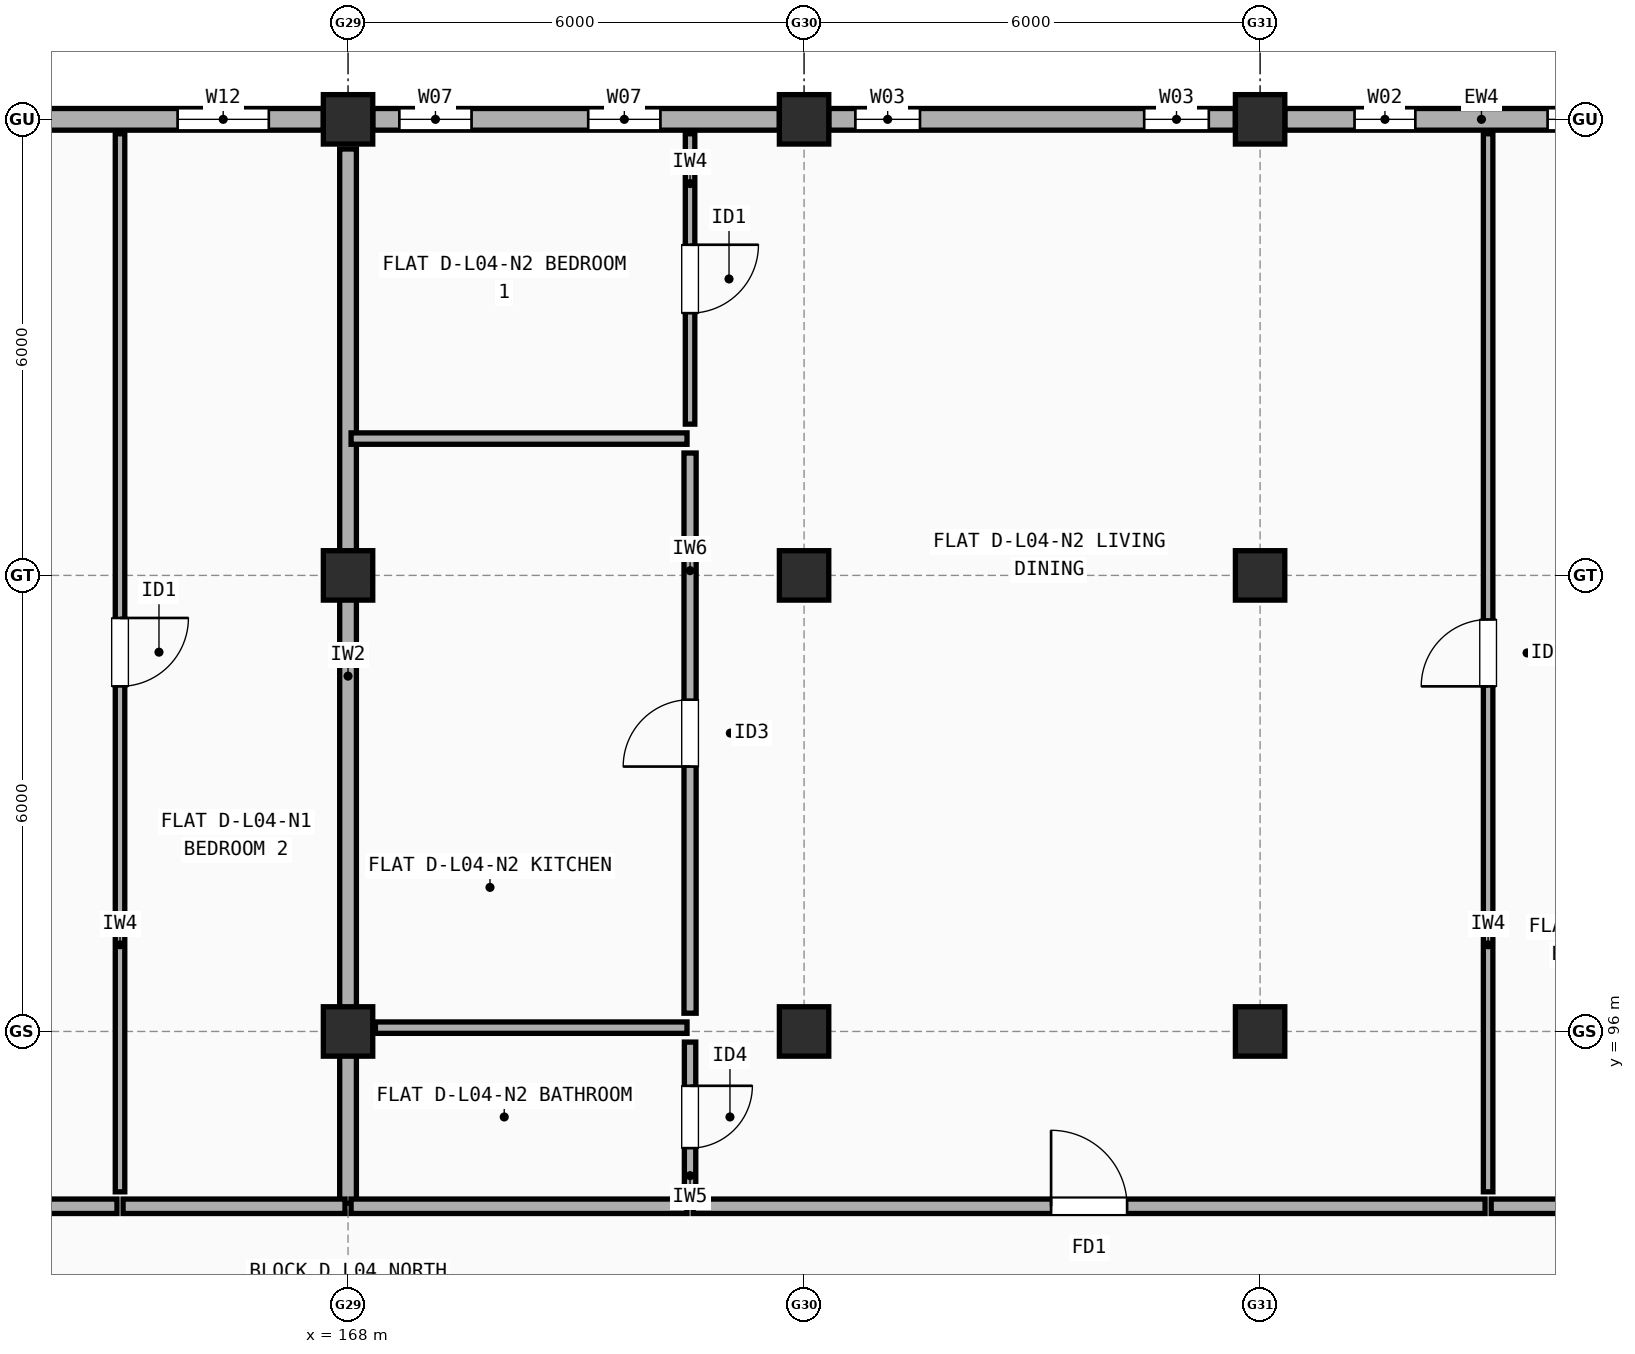
"""IFC4 building model, lengths in metres.
Left out: names, types, materials, properties, quantities, classifications, styles, units other than length and angle.
Written with IfcOpenShell. Run it as: python <this file> out.ifc"""

import sys

from ifc_helpers import new_model, si_unit, direction, frame, frame_2d, origin, origin_2d, place, context, subcontext, project, spatial, rectangle, extrude, element, fill, save


model = new_model("IFC4")
c1 = context("Model", 3, precision=1e-05, world=origin(), true_north=direction((0.0, 1.0)))
c2 = subcontext(c1, "Body", "Model", "MODEL_VIEW")
j1 = project(units=[si_unit("LENGTHUNIT", "METRE"), si_unit("PLANEANGLEUNIT", "RADIAN")], contexts=[c1])
p1 = place(None, origin())
s1 = spatial("IfcSite", under=j1, at=p1, CompositionType="ELEMENT")
p2 = place(p1, origin())
s2 = spatial("IfcBuilding", under=s1, at=p2, CompositionType="ELEMENT")
p3 = place(p2, frame((0.0, 0.0, 14.1)))
s3 = spatial("IfcBuildingStorey", under=s2, at=p3, CompositionType="ELEMENT", Elevation=14.1)
for number, where, z_axis, x_axis in (
    (1, (168.0, 96.0, 0.0), (0.0, 0.0, 1.0), (1.0, 0.0, 0.0)),
    (2, (168.0, 102.0, 0.0), (0.0, 0.0, 1.0), (1.0, 0.0, 0.0)),
    (3, (168.0, 108.0, 0.0), (0.0, 0.0, 1.0), (1.0, 0.0, 0.0)),
    (4, (174.0, 96.0, 0.0), (0.0, 0.0, 1.0), (1.0, 0.0, 0.0)),
    (5, (174.0, 102.0, 0.0), (0.0, 0.0, 1.0), (1.0, 0.0, 0.0)),
    (6, (174.0, 108.0, 0.0), (0.0, 0.0, 1.0), (1.0, 0.0, 0.0)),
    (7, (180.0, 96.0, 0.0), (0.0, 0.0, 1.0), (1.0, 0.0, 0.0)),
    (8, (180.0, 102.0, 0.0), (0.0, 0.0, 1.0), (1.0, 0.0, 0.0)),
    (9, (180.0, 108.0, 0.0), (0.0, 0.0, 1.0), (1.0, 0.0, 0.0)),
):
    element("IfcColumn", number, at=place(p3, frame(where, z_axis=z_axis, x_axis=x_axis)), inside=s3, PredefinedType="COLUMN", context=c2, shape_type="SweptSolid", body=[
        extrude(rectangle(XDim=0.65, YDim=0.65, at=origin_2d()), origin(), (0.0, 0.0, 1.0), 2.95),
    ])
p4 = place(p3, frame((185.725, 108.0, 0.0), z_axis=(0.0, 0.0, 1.0), x_axis=(-1.0, 0.0, 0.0)))
e10 = element("IfcWall", 10, at=p4, inside=s3, PredefinedType="STANDARD", context=c2, shape_type="SweptSolid", body=[
    extrude(rectangle(XDim=5.4, YDim=0.285, at=frame_2d((2.7, 0.0))), origin(), (0.0, 0.0, 1.0), 2.432),
])
p5 = place(p4, frame((0.742, 0.0, 0.9)))
e11 = element("IfcOpeningElement", 11, at=p5, cuts=e10, PredefinedType="OPENING", context=c2, shape_type="SweptSolid", body=[
    extrude(rectangle(XDim=1.2, YDim=1.35, at=frame_2d((0.6, 0.675))), frame((0.0, 0.152, 0.0), z_axis=(0.0, -1.0, 0.0), x_axis=(1.0, 0.0, 0.0)), (0.0, 0.0, 1.0), 0.305),
])
p6 = place(p4, frame((3.683, 0.0, 0.9)))
e12 = element("IfcOpeningElement", 12, at=p6, cuts=e10, PredefinedType="OPENING", context=c2, shape_type="SweptSolid", body=[
    extrude(rectangle(XDim=0.8, YDim=1.2, at=frame_2d((0.4, 0.6))), frame((0.0, 0.152, 0.0), z_axis=(0.0, -1.0, 0.0), x_axis=(1.0, 0.0, 0.0)), (0.0, 0.0, 1.0), 0.305),
])
p7 = place(p3, frame((179.675, 108.0, 0.0), z_axis=(0.0, 0.0, 1.0), x_axis=(-1.0, 0.0, 0.0)))
e13 = element("IfcWall", 13, at=p7, inside=s3, PredefinedType="STANDARD", context=c2, shape_type="SweptSolid", body=[
    extrude(rectangle(XDim=5.35, YDim=0.285, at=frame_2d((2.675, 0.0))), origin(), (0.0, 0.0, 1.0), 2.432),
])
p8 = place(p7, frame((0.35, 0.0, 0.9)))
e14 = element("IfcOpeningElement", 14, at=p8, cuts=e13, PredefinedType="OPENING", context=c2, shape_type="SweptSolid", body=[
    extrude(rectangle(XDim=0.85, YDim=1.25, at=frame_2d((0.425, 0.625))), frame((0.0, 0.152, 0.0), z_axis=(0.0, -1.0, 0.0), x_axis=(1.0, 0.0, 0.0)), (0.0, 0.0, 1.0), 0.305),
])
p9 = place(p7, frame((4.15, 0.0, 0.9)))
e15 = element("IfcOpeningElement", 15, at=p9, cuts=e13, PredefinedType="OPENING", context=c2, shape_type="SweptSolid", body=[
    extrude(rectangle(XDim=0.85, YDim=1.25, at=frame_2d((0.425, 0.625))), frame((0.0, 0.152, 0.0), z_axis=(0.0, -1.0, 0.0), x_axis=(1.0, 0.0, 0.0)), (0.0, 0.0, 1.0), 0.305),
])
p10 = place(p3, frame((173.675, 108.0, 0.0), z_axis=(0.0, 0.0, 1.0), x_axis=(-1.0, 0.0, 0.0)))
e16 = element("IfcWall", 16, at=p10, inside=s3, PredefinedType="STANDARD", context=c2, shape_type="SweptSolid", body=[
    extrude(rectangle(XDim=5.35, YDim=0.285, at=frame_2d((2.675, 0.0))), origin(), (0.0, 0.0, 1.0), 2.432),
])
p11 = place(p10, frame((1.565, 0.0, 0.9)))
e17 = element("IfcOpeningElement", 17, at=p11, cuts=e16, PredefinedType="OPENING", context=c2, shape_type="SweptSolid", body=[
    extrude(rectangle(XDim=0.95, YDim=1.35, at=frame_2d((0.475, 0.675))), frame((0.0, 0.152, 0.0), z_axis=(0.0, -1.0, 0.0), x_axis=(1.0, 0.0, 0.0)), (0.0, 0.0, 1.0), 0.305),
])
p12 = place(p10, frame((4.05, 0.0, 0.9)))
e18 = element("IfcOpeningElement", 18, at=p12, cuts=e16, PredefinedType="OPENING", context=c2, shape_type="SweptSolid", body=[
    extrude(rectangle(XDim=0.95, YDim=1.35, at=frame_2d((0.475, 0.675))), frame((0.0, 0.152, 0.0), z_axis=(0.0, -1.0, 0.0), x_axis=(1.0, 0.0, 0.0)), (0.0, 0.0, 1.0), 0.305),
])
p13 = place(p3, frame((167.675, 108.0, 0.0), z_axis=(0.0, 0.0, 1.0), x_axis=(-1.0, 0.0, 0.0)))
e19 = element("IfcWall", 19, at=p13, inside=s3, PredefinedType="STANDARD", context=c2, shape_type="SweptSolid", body=[
    extrude(rectangle(XDim=5.35, YDim=0.285, at=frame_2d((2.675, 0.0))), origin(), (0.0, 0.0, 1.0), 2.432),
])
p14 = place(p13, frame((0.718, 0.0, 0.9)))
e20 = element("IfcOpeningElement", 20, at=p14, cuts=e19, PredefinedType="OPENING", context=c2, shape_type="SweptSolid", body=[
    extrude(rectangle(XDim=1.2, YDim=1.35, at=frame_2d((0.6, 0.675))), frame((0.0, 0.152, 0.0), z_axis=(0.0, -1.0, 0.0), x_axis=(1.0, 0.0, 0.0)), (0.0, 0.0, 1.0), 0.305),
])
p15 = place(p13, frame((3.633, 0.0, 0.9)))
e21 = element("IfcOpeningElement", 21, at=p15, cuts=e19, PredefinedType="OPENING", context=c2, shape_type="SweptSolid", body=[
    extrude(rectangle(XDim=0.8, YDim=1.2, at=frame_2d((0.4, 0.6))), frame((0.0, 0.152, 0.0), z_axis=(0.0, -1.0, 0.0), x_axis=(1.0, 0.0, 0.0)), (0.0, 0.0, 1.0), 0.305),
])
p16 = place(p3, frame((168.0, 93.74, 0.0), z_axis=(0.0, 0.0, 1.0), x_axis=(0.0, 1.0, 0.0)))
e22 = element("IfcWall", 22, at=p16, inside=s3, PredefinedType="SOLIDWALL", context=c2, shape_type="SweptSolid", body=[
    extrude(rectangle(XDim=13.87, YDim=0.22, at=frame_2d((6.935, 0.0))), origin(), (0.0, 0.0, 1.0), 2.458),
])
p17 = place(p3, frame((154.54, 93.7, 0.0), z_axis=(0.0, 0.0, 1.0), x_axis=(1.0, 0.0, 0.0)))
e23 = element("IfcWall", 23, at=p17, inside=s3, PredefinedType="SOLIDWALL", context=c2, shape_type="SweptSolid", body=[
    extrude(rectangle(XDim=10.42, YDim=0.19, at=frame_2d((5.21, 0.0))), origin(), (0.0, 0.0, 1.0), 2.432),
])
p18 = place(p17, frame((4.72, 0.0, 0.0)))
e24 = element("IfcOpeningElement", 24, at=p18, cuts=e23, PredefinedType="OPENING", context=c2, shape_type="SweptSolid", body=[
    extrude(rectangle(XDim=0.98, YDim=2.15, at=frame_2d((0.49, 1.075))), frame((0.0, 0.105, 0.0), z_axis=(0.0, -1.0, 0.0), x_axis=(1.0, 0.0, 0.0)), (0.0, 0.0, 1.0), 0.21),
])
p19 = place(p3, frame((165.04, 93.7, 0.0), z_axis=(0.0, 0.0, 1.0), x_axis=(1.0, 0.0, 0.0)))
e25 = element("IfcWall", 25, at=p19, inside=s3, PredefinedType="SOLIDWALL", context=c2, shape_type="SweptSolid", body=[
    extrude(rectangle(XDim=2.92, YDim=0.19, at=frame_2d((1.46, 0.0))), origin(), (0.0, 0.0, 1.0), 2.508),
])
p20 = place(p3, frame((165.0, 93.89, 0.0), z_axis=(0.0, 0.0, 1.0), x_axis=(0.0, 1.0, 0.0)))
e26 = element("IfcWall", 26, at=p20, inside=s3, PredefinedType="PARTITIONING", context=c2, shape_type="SweptSolid", body=[
    extrude(rectangle(XDim=13.92, YDim=0.125, at=frame_2d((6.96, 0.0))), origin(), (0.0, 0.0, 1.0), 2.408),
])
p21 = place(p20, frame((6.65, 0.0, 0.0)))
e27 = element("IfcOpeningElement", 27, at=p21, cuts=e26, PredefinedType="OPENING", context=c2, shape_type="SweptSolid", body=[
    extrude(rectangle(XDim=0.9, YDim=2.1, at=frame_2d((0.45, 1.05))), frame((0.0, 0.073, 0.0), z_axis=(0.0, -1.0, 0.0), x_axis=(1.0, 0.0, 0.0)), (0.0, 0.0, 1.0), 0.145),
])
p22 = place(p3, frame((168.04, 93.7, 0.0), z_axis=(0.0, 0.0, 1.0), x_axis=(1.0, 0.0, 0.0)))
e28 = element("IfcWall", 28, at=p22, inside=s3, PredefinedType="SOLIDWALL", context=c2, shape_type="SweptSolid", body=[
    extrude(rectangle(XDim=4.42, YDim=0.19, at=frame_2d((2.21, 0.0))), origin(), (0.0, 0.0, 1.0), 2.508),
])
p23 = place(p3, frame((172.54, 93.7, 0.0), z_axis=(0.0, 0.0, 1.0), x_axis=(1.0, 0.0, 0.0)))
e29 = element("IfcWall", 29, at=p23, inside=s3, PredefinedType="SOLIDWALL", context=c2, shape_type="SweptSolid", body=[
    extrude(rectangle(XDim=10.42, YDim=0.19, at=frame_2d((5.21, 0.0))), origin(), (0.0, 0.0, 1.0), 2.95),
])
p24 = place(p23, frame((4.71, 0.0, 0.0)))
e30 = element("IfcOpeningElement", 30, at=p24, cuts=e29, PredefinedType="OPENING", context=c2, shape_type="SweptSolid", body=[
    extrude(rectangle(XDim=1.0, YDim=2.15, at=frame_2d((0.5, 1.075))), frame((0.0, 0.105, 0.0), z_axis=(0.0, -1.0, 0.0), x_axis=(1.0, 0.0, 0.0)), (0.0, 0.0, 1.0), 0.21),
])
p25 = place(p3, frame((172.5, 103.99, 0.0), z_axis=(0.0, 0.0, 1.0), x_axis=(0.0, 1.0, 0.0)))
e31 = element("IfcWall", 31, at=p25, inside=s3, PredefinedType="PARTITIONING", context=c2, shape_type="SweptSolid", body=[
    extrude(rectangle(XDim=3.82, YDim=0.125, at=frame_2d((1.91, 0.0))), origin(), (0.0, 0.0, 1.0), 2.95),
])
p26 = place(p25, frame((1.46, 0.0, 0.0)))
e32 = element("IfcOpeningElement", 32, at=p26, cuts=e31, PredefinedType="OPENING", context=c2, shape_type="SweptSolid", body=[
    extrude(rectangle(XDim=0.9, YDim=2.1, at=frame_2d((0.45, 1.05))), frame((0.0, 0.073, 0.0), z_axis=(0.0, -1.0, 0.0), x_axis=(1.0, 0.0, 0.0)), (0.0, 0.0, 1.0), 0.145),
])
p27 = place(p3, frame((172.5, 96.24, 0.0), z_axis=(0.0, 0.0, 1.0), x_axis=(0.0, 1.0, 0.0)))
e33 = element("IfcWall", 33, at=p27, inside=s3, PredefinedType="PLUMBINGWALL", context=c2, shape_type="SweptSolid", body=[
    extrude(rectangle(XDim=7.37, YDim=0.16, at=frame_2d((3.685, 0.0))), origin(), (0.0, 0.0, 1.0), 2.432),
])
p28 = place(p27, frame((3.245, 0.0, 0.0)))
e34 = element("IfcOpeningElement", 34, at=p28, cuts=e33, PredefinedType="OPENING", context=c2, shape_type="SweptSolid", body=[
    extrude(rectangle(XDim=0.88, YDim=2.1, at=frame_2d((0.44, 1.05))), frame((0.0, 0.09, 0.0), z_axis=(0.0, -1.0, 0.0), x_axis=(1.0, 0.0, 0.0)), (0.0, 0.0, 1.0), 0.18),
])
p29 = place(p3, frame((172.5, 93.89, 0.0), z_axis=(0.0, 0.0, 1.0), x_axis=(0.0, 1.0, 0.0)))
e35 = element("IfcWall", 35, at=p29, inside=s3, PredefinedType="PARTITIONING", context=c2, shape_type="SweptSolid", body=[
    extrude(rectangle(XDim=1.97, YDim=0.15, at=frame_2d((0.985, 0.0))), origin(), (0.0, 0.0, 1.0), 2.95),
])
p30 = place(p29, frame((0.575, 0.0, 0.0)))
e36 = element("IfcOpeningElement", 36, at=p30, cuts=e35, PredefinedType="OPENING", context=c2, shape_type="SweptSolid", body=[
    extrude(rectangle(XDim=0.82, YDim=2.08, at=frame_2d((0.41, 1.04))), frame((0.0, 0.085, 0.0), z_axis=(0.0, -1.0, 0.0), x_axis=(1.0, 0.0, 0.0)), (0.0, 0.0, 1.0), 0.17),
])
p31 = place(p3, frame((168.04, 103.8, 0.0), z_axis=(0.0, 0.0, 1.0), x_axis=(1.0, 0.0, 0.0)))
e37 = element("IfcWall", 37, at=p31, inside=s3, PredefinedType="PARTITIONING", context=c2, shape_type="SweptSolid", body=[
    extrude(rectangle(XDim=4.42, YDim=0.15, at=frame_2d((2.21, 0.0))), origin(), (0.0, 0.0, 1.0), 2.458),
])
p32 = place(p3, frame((168.36, 96.05, 0.0), z_axis=(0.0, 0.0, 1.0), x_axis=(1.0, 0.0, 0.0)))
e38 = element("IfcWall", 38, at=p32, inside=s3, PredefinedType="PARTITIONING", context=c2, shape_type="SweptSolid", body=[
    extrude(rectangle(XDim=4.1, YDim=0.15, at=frame_2d((2.05, 0.0))), origin(), (0.0, 0.0, 1.0), 2.548),
])
p33 = place(p3, frame((183.04, 93.7, 0.0), z_axis=(0.0, 0.0, 1.0), x_axis=(1.0, 0.0, 0.0)))
e39 = element("IfcWall", 39, at=p33, inside=s3, PredefinedType="SOLIDWALL", context=c2, shape_type="SweptSolid", body=[
    extrude(rectangle(XDim=2.92, YDim=0.19, at=frame_2d((1.46, 0.0))), origin(), (0.0, 0.0, 1.0), 2.432),
])
p34 = place(p3, frame((183.0, 93.89, 0.0), z_axis=(0.0, 0.0, 1.0), x_axis=(0.0, 1.0, 0.0)))
e40 = element("IfcWall", 40, at=p34, inside=s3, PredefinedType="PARTITIONING", context=c2, shape_type="SweptSolid", body=[
    extrude(rectangle(XDim=13.92, YDim=0.125, at=frame_2d((6.96, 0.0))), origin(), (0.0, 0.0, 1.0), 2.408),
])
p35 = place(p34, frame((6.65, 0.0, 0.0)))
e41 = element("IfcOpeningElement", 41, at=p35, cuts=e40, PredefinedType="OPENING", context=c2, shape_type="SweptSolid", body=[
    extrude(rectangle(XDim=0.88, YDim=2.1, at=frame_2d((0.44, 1.05))), frame((0.0, 0.073, 0.0), z_axis=(0.0, -1.0, 0.0), x_axis=(1.0, 0.0, 0.0)), (0.0, 0.0, 1.0), 0.145),
])
p36 = place(p5, origin())
e42 = element("IfcWindow", 42, at=p36, inside=s3, PartitioningType="SINGLE_PANEL", PredefinedType="WINDOW", context=c2, shape_type="SweptSolid", body=[
    extrude(rectangle(XDim=1.2, YDim=1.35, at=frame_2d((0.6, 0.675))), frame((0.0, 0.03, 0.0), z_axis=(0.0, -1.0, 0.0), x_axis=(1.0, 0.0, 0.0)), (0.0, 0.0, 1.0), 0.06),
])
fill(e11, e42)
p37 = place(p6, origin())
e43 = element("IfcWindow", 43, at=p37, inside=s3, PartitioningType="SINGLE_PANEL", PredefinedType="WINDOW", context=c2, shape_type="SweptSolid", body=[
    extrude(rectangle(XDim=0.8, YDim=1.2, at=frame_2d((0.4, 0.6))), frame((0.0, 0.03, 0.0), z_axis=(0.0, -1.0, 0.0), x_axis=(1.0, 0.0, 0.0)), (0.0, 0.0, 1.0), 0.06),
])
fill(e12, e43)
p38 = place(p8, origin())
e44 = element("IfcWindow", 44, at=p38, inside=s3, PartitioningType="SINGLE_PANEL", PredefinedType="WINDOW", context=c2, shape_type="SweptSolid", body=[
    extrude(rectangle(XDim=0.85, YDim=1.25, at=frame_2d((0.425, 0.625))), frame((0.0, 0.03, 0.0), z_axis=(0.0, -1.0, 0.0), x_axis=(1.0, 0.0, 0.0)), (0.0, 0.0, 1.0), 0.06),
])
fill(e14, e44)
p39 = place(p9, origin())
e45 = element("IfcWindow", 45, at=p39, inside=s3, PartitioningType="SINGLE_PANEL", PredefinedType="WINDOW", context=c2, shape_type="SweptSolid", body=[
    extrude(rectangle(XDim=0.85, YDim=1.25, at=frame_2d((0.425, 0.625))), frame((0.0, 0.03, 0.0), z_axis=(0.0, -1.0, 0.0), x_axis=(1.0, 0.0, 0.0)), (0.0, 0.0, 1.0), 0.06),
])
fill(e15, e45)
p40 = place(p11, origin())
e46 = element("IfcWindow", 46, at=p40, inside=s3, PartitioningType="SINGLE_PANEL", PredefinedType="WINDOW", context=c2, shape_type="SweptSolid", body=[
    extrude(rectangle(XDim=0.95, YDim=1.35, at=frame_2d((0.475, 0.675))), frame((0.0, 0.03, 0.0), z_axis=(0.0, -1.0, 0.0), x_axis=(1.0, 0.0, 0.0)), (0.0, 0.0, 1.0), 0.06),
])
fill(e17, e46)
p41 = place(p12, origin())
e47 = element("IfcWindow", 47, at=p41, inside=s3, PartitioningType="SINGLE_PANEL", PredefinedType="WINDOW", context=c2, shape_type="SweptSolid", body=[
    extrude(rectangle(XDim=0.95, YDim=1.35, at=frame_2d((0.475, 0.675))), frame((0.0, 0.03, 0.0), z_axis=(0.0, -1.0, 0.0), x_axis=(1.0, 0.0, 0.0)), (0.0, 0.0, 1.0), 0.06),
])
fill(e18, e47)
p42 = place(p14, origin())
e48 = element("IfcWindow", 48, at=p42, inside=s3, PartitioningType="SINGLE_PANEL", PredefinedType="WINDOW", context=c2, shape_type="SweptSolid", body=[
    extrude(rectangle(XDim=1.2, YDim=1.35, at=frame_2d((0.6, 0.675))), frame((0.0, 0.03, 0.0), z_axis=(0.0, -1.0, 0.0), x_axis=(1.0, 0.0, 0.0)), (0.0, 0.0, 1.0), 0.06),
])
fill(e20, e48)
p43 = place(p21, origin())
e49 = element("IfcDoor", 49, at=p43, inside=s3, OperationType="SINGLE_SWING_RIGHT", PredefinedType="DOOR", context=c2, shape_type="SweptSolid", body=[
    extrude(rectangle(XDim=0.9, YDim=2.1, at=frame_2d((0.45, 1.05))), frame((0.0, 0.025, 0.0), z_axis=(0.0, -1.0, 0.0), x_axis=(1.0, 0.0, 0.0)), (0.0, 0.0, 1.0), 0.05),
])
fill(e27, e49)
p44 = place(p24, origin())
e50 = element("IfcDoor", 50, at=p44, inside=s3, OperationType="SINGLE_SWING_LEFT", PredefinedType="DOOR", context=c2, shape_type="SweptSolid", body=[
    extrude(rectangle(XDim=1.0, YDim=2.15, at=frame_2d((0.5, 1.075))), frame((0.0, 0.025, 0.0), z_axis=(0.0, -1.0, 0.0), x_axis=(1.0, 0.0, 0.0)), (0.0, 0.0, 1.0), 0.05),
])
fill(e30, e50)
p45 = place(p26, origin())
e51 = element("IfcDoor", 51, at=p45, inside=s3, OperationType="SINGLE_SWING_RIGHT", PredefinedType="DOOR", context=c2, shape_type="SweptSolid", body=[
    extrude(rectangle(XDim=0.9, YDim=2.1, at=frame_2d((0.45, 1.05))), frame((0.0, 0.025, 0.0), z_axis=(0.0, -1.0, 0.0), x_axis=(1.0, 0.0, 0.0)), (0.0, 0.0, 1.0), 0.05),
])
fill(e32, e51)
p46 = place(p28, origin())
e52 = element("IfcDoor", 52, at=p46, inside=s3, OperationType="SINGLE_SWING_LEFT", PredefinedType="DOOR", context=c2, shape_type="SweptSolid", body=[
    extrude(rectangle(XDim=0.88, YDim=2.1, at=frame_2d((0.44, 1.05))), frame((0.0, 0.025, 0.0), z_axis=(0.0, -1.0, 0.0), x_axis=(1.0, 0.0, 0.0)), (0.0, 0.0, 1.0), 0.05),
])
fill(e34, e52)
p47 = place(p30, origin())
e53 = element("IfcDoor", 53, at=p47, inside=s3, OperationType="SINGLE_SWING_RIGHT", PredefinedType="DOOR", context=c2, shape_type="SweptSolid", body=[
    extrude(rectangle(XDim=0.82, YDim=2.08, at=frame_2d((0.41, 1.04))), frame((0.0, 0.025, 0.0), z_axis=(0.0, -1.0, 0.0), x_axis=(1.0, 0.0, 0.0)), (0.0, 0.0, 1.0), 0.05),
])
fill(e36, e53)
p48 = place(p35, origin())
e54 = element("IfcDoor", 54, at=p48, inside=s3, OperationType="SINGLE_SWING_LEFT", PredefinedType="DOOR", context=c2, shape_type="SweptSolid", body=[
    extrude(rectangle(XDim=0.88, YDim=2.1, at=frame_2d((0.44, 1.05))), frame((0.0, 0.025, 0.0), z_axis=(0.0, -1.0, 0.0), x_axis=(1.0, 0.0, 0.0)), (0.0, 0.0, 1.0), 0.05),
])
fill(e41, e54)
save(model, sys.argv[1])
